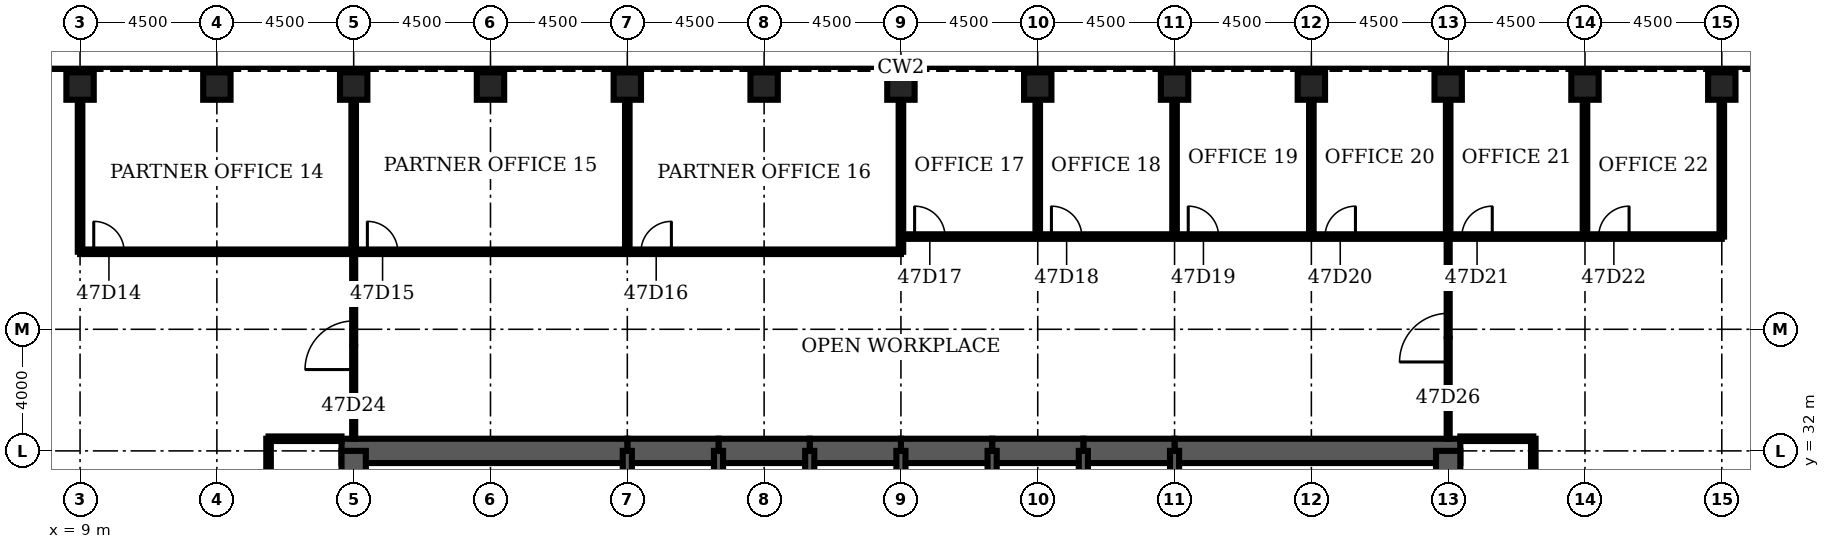
"""IFC4 building model, lengths in metres.
Left out: names, types, materials, properties, quantities, classifications, styles, units other than length and angle.
Written with IfcOpenShell. Run it as: python <this file> out.ifc"""

import sys

from ifc_helpers import new_model, si_unit, direction, frame, frame_2d, origin, origin_2d, place, context, subcontext, project, spatial, rectangle, hollow_rectangle, extrude, element, fill, save


model = new_model("IFC4")
c1 = context("Model", 3, precision=1e-05, world=origin(), true_north=direction((0.0, 1.0)))
c2 = subcontext(c1, "Body", "Model", "MODEL_VIEW")
j1 = project(units=[si_unit("LENGTHUNIT", "METRE"), si_unit("PLANEANGLEUNIT", "RADIAN")], contexts=[c1])
p1 = place(None, origin())
s1 = spatial("IfcSite", under=j1, at=p1, CompositionType="ELEMENT")
p2 = place(p1, origin())
s2 = spatial("IfcBuilding", under=s1, at=p2, CompositionType="ELEMENT")
p3 = place(p2, frame((0.0, 0.0, 211.0)))
s3 = spatial("IfcBuildingStorey", under=s2, at=p3, CompositionType="ELEMENT", Elevation=211.0)
for number, where, z_axis, x_axis in (
    (1, (63.0, 44.0, 0.0), (0.0, 0.0, 1.0), (0.0, 1.0, 0.0)),
    (2, (58.5, 44.0, 0.0), (0.0, 0.0, 1.0), (0.0, 1.0, 0.0)),
    (3, (54.0, 44.0, 0.0), (0.0, 0.0, 1.0), (0.0, 1.0, 0.0)),
    (4, (49.5, 44.0, 0.0), (0.0, 0.0, 1.0), (0.0, 1.0, 0.0)),
    (5, (45.0, 44.0, 0.0), (0.0, 0.0, 1.0), (0.0, 1.0, 0.0)),
    (6, (40.5, 44.0, 0.0), (0.0, 0.0, 1.0), (0.0, 1.0, 0.0)),
    (7, (36.0, 44.0, 0.0), (0.0, 0.0, 1.0), (0.0, 1.0, 0.0)),
    (8, (31.5, 44.0, 0.0), (0.0, 0.0, 1.0), (0.0, 1.0, 0.0)),
    (9, (27.0, 44.0, 0.0), (0.0, 0.0, 1.0), (0.0, 1.0, 0.0)),
    (10, (22.5, 44.0, 0.0), (0.0, 0.0, 1.0), (0.0, 1.0, 0.0)),
    (11, (18.0, 44.0, 0.0), (0.0, 0.0, 1.0), (0.0, 1.0, 0.0)),
    (12, (13.5, 44.0, 0.0), (0.0, 0.0, 1.0), (0.0, 1.0, 0.0)),
    (13, (9.0, 44.0, 0.0), (0.0, 0.0, 1.0), (0.0, 1.0, 0.0)),
):
    element("IfcColumn", number, at=place(p3, frame(where, z_axis=z_axis, x_axis=x_axis)), inside=s3, PredefinedType="COLUMN", context=c2, shape_type="SweptSolid", body=[
        extrude(hollow_rectangle(XDim=0.9, YDim=0.9, WallThickness=0.08, at=origin_2d()), origin(), (0.0, 0.0, 1.0), 4.2),
    ])
p4 = place(p3, frame((54.4, 32.0, 0.0), z_axis=(0.0, 0.0, 1.0), x_axis=(-1.0, 0.0, 0.0)))
e14 = element("IfcWall", 14, at=p4, inside=s3, PredefinedType="SHEAR", context=c2, shape_type="SweptSolid", body=[
    extrude(rectangle(XDim=9.4, YDim=0.8, at=frame_2d((4.7, 0.0))), origin(), (0.0, 0.0, 1.0), 4.2),
])
for number, where, z_axis, x_axis in (
    (15, (45.0, 32.0, 0.0), (0.0, 0.0, 1.0), (-1.0, 0.0, 0.0)),
    (16, (42.0, 32.0, 0.0), (0.0, 0.0, 1.0), (-1.0, 0.0, 0.0)),
    (17, (39.0, 32.0, 0.0), (0.0, 0.0, 1.0), (-1.0, 0.0, 0.0)),
    (18, (36.0, 32.0, 0.0), (0.0, 0.0, 1.0), (-1.0, 0.0, 0.0)),
    (19, (33.0, 32.0, 0.0), (0.0, 0.0, 1.0), (-1.0, 0.0, 0.0)),
    (20, (30.0, 32.0, 0.0), (0.0, 0.0, 1.0), (-1.0, 0.0, 0.0)),
):
    element("IfcWall", number, at=place(p3, frame(where, z_axis=z_axis, x_axis=x_axis)), inside=s3, PredefinedType="SHEAR", context=c2, shape_type="SweptSolid", body=[
        extrude(rectangle(XDim=3.0, YDim=0.8, at=frame_2d((1.5, 0.0))), origin(), (0.0, 0.0, 1.0), 4.2),
    ])
p5 = place(p3, frame((27.0, 32.0, 0.0), z_axis=(0.0, 0.0, 1.0), x_axis=(-1.0, 0.0, 0.0)))
e21 = element("IfcWall", 21, at=p5, inside=s3, PredefinedType="SHEAR", context=c2, shape_type="SweptSolid", body=[
    extrude(rectangle(XDim=9.4, YDim=0.8, at=frame_2d((4.7, 0.0))), origin(), (0.0, 0.0, 1.0), 4.2),
])
for number, where, z_axis, x_axis in (
    (22, (18.0, 32.0, 0.0), (0.0, 0.0, 1.0), (0.0, -1.0, 0.0)),
    (23, (54.0, 28.8, 0.0), (0.0, 0.0, 1.0), (0.0, 1.0, 0.0)),
):
    element("IfcWall", number, at=place(p3, frame(where, z_axis=z_axis, x_axis=x_axis)), inside=s3, PredefinedType="SHEAR", context=c2, shape_type="SweptSolid", body=[
        extrude(rectangle(XDim=3.2, YDim=0.8, at=frame_2d((1.6, 0.0))), origin(), (0.0, 0.0, 1.0), 4.2),
    ])
for number, where, z_axis, x_axis in (
    (24, (27.0, 28.8, 0.0), (0.0, 0.0, 1.0), (0.0, 1.0, 0.0)),
    (25, (30.0, 28.8, 0.0), (0.0, 0.0, 1.0), (0.0, 1.0, 0.0)),
    (26, (33.0, 28.8, 0.0), (0.0, 0.0, 1.0), (0.0, 1.0, 0.0)),
    (27, (36.0, 28.8, 0.0), (0.0, 0.0, 1.0), (0.0, 1.0, 0.0)),
    (28, (39.0, 28.8, 0.0), (0.0, 0.0, 1.0), (0.0, 1.0, 0.0)),
    (29, (42.0, 28.8, 0.0), (0.0, 0.0, 1.0), (0.0, 1.0, 0.0)),
    (30, (45.0, 28.8, 0.0), (0.0, 0.0, 1.0), (0.0, 1.0, 0.0)),
):
    element("IfcWall", number, at=place(p3, frame(where, z_axis=z_axis, x_axis=x_axis)), inside=s3, PredefinedType="SOLIDWALL", context=c2, shape_type="SweptSolid", body=[
        extrude(rectangle(XDim=3.2, YDim=0.3, at=frame_2d((1.6, 0.0))), origin(), (0.0, 0.0, 1.0), 4.2),
    ])
for number, where, z_axis, x_axis in (
    (31, (15.2, 32.4, 0.0), (0.0, 0.0, 1.0), (1.0, 0.0, 0.0)),
    (32, (54.4, 32.4, 0.0), (0.0, 0.0, 1.0), (1.0, 0.0, 0.0)),
):
    element("IfcWall", number, at=place(p3, frame(where, z_axis=z_axis, x_axis=x_axis)), inside=s3, PredefinedType="PARTITIONING", context=c2, shape_type="SweptSolid", body=[
        extrude(rectangle(XDim=2.4, YDim=0.15, at=frame_2d((1.2, 0.0))), origin(), (0.0, 0.0, 1.0), 3.0),
    ])
p6 = place(p3, frame((9.0, 38.55, 0.0), z_axis=(0.0, 0.0, 1.0), x_axis=(1.0, 0.0, 0.0)))
e33 = element("IfcWall", 33, at=p6, inside=s3, PredefinedType="PARTITIONING", context=c2, shape_type="SweptSolid", body=[
    extrude(rectangle(XDim=27.0, YDim=0.15, at=frame_2d((13.5, 0.0))), origin(), (0.0, 0.0, 1.0), 3.0),
])
p7 = place(p6, frame((0.45, 0.0, 0.0)))
e34 = element("IfcOpeningElement", 34, at=p7, cuts=e33, PredefinedType="OPENING", context=c2, shape_type="SweptSolid", body=[
    extrude(rectangle(XDim=1.0, YDim=2.1, at=frame_2d((0.5, 1.05))), frame((0.0, 0.085, 0.0), z_axis=(0.0, -1.0, 0.0), x_axis=(1.0, 0.0, 0.0)), (0.0, 0.0, 1.0), 0.17),
])
p8 = place(p6, frame((9.45, 0.0, 0.0)))
e35 = element("IfcOpeningElement", 35, at=p8, cuts=e33, PredefinedType="OPENING", context=c2, shape_type="SweptSolid", body=[
    extrude(rectangle(XDim=1.0, YDim=2.1, at=frame_2d((0.5, 1.05))), frame((0.0, 0.085, 0.0), z_axis=(0.0, -1.0, 0.0), x_axis=(1.0, 0.0, 0.0)), (0.0, 0.0, 1.0), 0.17),
])
p9 = place(p6, frame((18.45, 0.0, 0.0)))
e36 = element("IfcOpeningElement", 36, at=p9, cuts=e33, PredefinedType="OPENING", context=c2, shape_type="SweptSolid", body=[
    extrude(rectangle(XDim=1.0, YDim=2.1, at=frame_2d((0.5, 1.05))), frame((0.0, 0.085, 0.0), z_axis=(0.0, -1.0, 0.0), x_axis=(1.0, 0.0, 0.0)), (0.0, 0.0, 1.0), 0.17),
])
p10 = place(p3, frame((36.0, 39.05, 0.0), z_axis=(0.0, 0.0, 1.0), x_axis=(1.0, 0.0, 0.0)))
e37 = element("IfcWall", 37, at=p10, inside=s3, PredefinedType="PARTITIONING", context=c2, shape_type="SweptSolid", body=[
    extrude(rectangle(XDim=27.0, YDim=0.15, at=frame_2d((13.5, 0.0))), origin(), (0.0, 0.0, 1.0), 3.0),
])
p11 = place(p10, frame((0.45, 0.0, 0.0)))
e38 = element("IfcOpeningElement", 38, at=p11, cuts=e37, PredefinedType="OPENING", context=c2, shape_type="SweptSolid", body=[
    extrude(rectangle(XDim=1.0, YDim=2.1, at=frame_2d((0.5, 1.05))), frame((0.0, 0.085, 0.0), z_axis=(0.0, -1.0, 0.0), x_axis=(1.0, 0.0, 0.0)), (0.0, 0.0, 1.0), 0.17),
])
p12 = place(p10, frame((4.95, 0.0, 0.0)))
e39 = element("IfcOpeningElement", 39, at=p12, cuts=e37, PredefinedType="OPENING", context=c2, shape_type="SweptSolid", body=[
    extrude(rectangle(XDim=1.0, YDim=2.1, at=frame_2d((0.5, 1.05))), frame((0.0, 0.085, 0.0), z_axis=(0.0, -1.0, 0.0), x_axis=(1.0, 0.0, 0.0)), (0.0, 0.0, 1.0), 0.17),
])
p13 = place(p10, frame((9.45, 0.0, 0.0)))
e40 = element("IfcOpeningElement", 40, at=p13, cuts=e37, PredefinedType="OPENING", context=c2, shape_type="SweptSolid", body=[
    extrude(rectangle(XDim=1.0, YDim=2.1, at=frame_2d((0.5, 1.05))), frame((0.0, 0.085, 0.0), z_axis=(0.0, -1.0, 0.0), x_axis=(1.0, 0.0, 0.0)), (0.0, 0.0, 1.0), 0.17),
])
p14 = place(p10, frame((13.95, 0.0, 0.0)))
e41 = element("IfcOpeningElement", 41, at=p14, cuts=e37, PredefinedType="OPENING", context=c2, shape_type="SweptSolid", body=[
    extrude(rectangle(XDim=1.0, YDim=2.1, at=frame_2d((0.5, 1.05))), frame((0.0, 0.085, 0.0), z_axis=(0.0, -1.0, 0.0), x_axis=(1.0, 0.0, 0.0)), (0.0, 0.0, 1.0), 0.17),
])
p15 = place(p10, frame((18.45, 0.0, 0.0)))
e42 = element("IfcOpeningElement", 42, at=p15, cuts=e37, PredefinedType="OPENING", context=c2, shape_type="SweptSolid", body=[
    extrude(rectangle(XDim=1.0, YDim=2.1, at=frame_2d((0.5, 1.05))), frame((0.0, 0.085, 0.0), z_axis=(0.0, -1.0, 0.0), x_axis=(1.0, 0.0, 0.0)), (0.0, 0.0, 1.0), 0.17),
])
p16 = place(p10, frame((22.95, 0.0, 0.0)))
e43 = element("IfcOpeningElement", 43, at=p16, cuts=e37, PredefinedType="OPENING", context=c2, shape_type="SweptSolid", body=[
    extrude(rectangle(XDim=1.0, YDim=2.1, at=frame_2d((0.5, 1.05))), frame((0.0, 0.085, 0.0), z_axis=(0.0, -1.0, 0.0), x_axis=(1.0, 0.0, 0.0)), (0.0, 0.0, 1.0), 0.17),
])
p17 = place(p3, frame((9.0, 38.55, 0.0), z_axis=(0.0, 0.0, 1.0), x_axis=(0.0, 1.0, 0.0)))
e44 = element("IfcWall", 44, at=p17, inside=s3, PredefinedType="PARTITIONING", context=c2, shape_type="SweptSolid", body=[
    extrude(rectangle(XDim=5.0, YDim=0.15, at=frame_2d((2.5, 0.0))), origin(), (0.0, 0.0, 1.0), 3.0),
])
p18 = place(p3, frame((15.2, 13.8, 0.0), z_axis=(0.0, 0.0, 1.0), x_axis=(0.0, 1.0, 0.0)))
e45 = element("IfcWall", 45, at=p18, inside=s3, PredefinedType="PARTITIONING", context=c2, shape_type="SweptSolid", body=[
    extrude(rectangle(XDim=18.6, YDim=0.15, at=frame_2d((9.3, 0.0))), origin(), (0.0, 0.0, 1.0), 3.0),
])
p19 = place(p18, frame((8.7, 0.0, 0.0)))
e46 = element("IfcOpeningElement", 46, at=p19, cuts=e45, PredefinedType="OPENING", context=c2, shape_type="SweptSolid", body=[
    extrude(rectangle(XDim=1.2, YDim=2.1, at=frame_2d((0.6, 1.05))), frame((0.0, 0.085, 0.0), z_axis=(0.0, -1.0, 0.0), x_axis=(1.0, 0.0, 0.0)), (0.0, 0.0, 1.0), 0.17),
])
p20 = place(p3, frame((18.0, 32.4, 0.0), z_axis=(0.0, 0.0, 1.0), x_axis=(0.0, 1.0, 0.0)))
e47 = element("IfcWall", 47, at=p20, inside=s3, PredefinedType="PARTITIONING", context=c2, shape_type="SweptSolid", body=[
    extrude(rectangle(XDim=6.15, YDim=0.1, at=frame_2d((3.075, 0.0))), origin(), (0.0, 0.0, 1.0), 3.0),
])
p21 = place(p20, frame((2.275, 0.0, 0.0)))
e48 = element("IfcOpeningElement", 48, at=p21, cuts=e47, PredefinedType="OPENING", context=c2, shape_type="SweptSolid", body=[
    extrude(rectangle(XDim=1.6, YDim=2.1, at=frame_2d((0.8, 1.05))), frame((0.0, 0.06, 0.0), z_axis=(0.0, -1.0, 0.0), x_axis=(1.0, 0.0, 0.0)), (0.0, 0.0, 1.0), 0.12),
])
for number, where, z_axis, x_axis in (
    (49, (18.0, 38.55, 0.0), (0.0, 0.0, 1.0), (0.0, 1.0, 0.0)),
    (50, (27.0, 38.55, 0.0), (0.0, 0.0, 1.0), (0.0, 1.0, 0.0)),
    (51, (36.0, 38.55, 0.0), (0.0, 0.0, 1.0), (0.0, 1.0, 0.0)),
):
    element("IfcWall", number, at=place(p3, frame(where, z_axis=z_axis, x_axis=x_axis)), inside=s3, PredefinedType="PARTITIONING", context=c2, shape_type="SweptSolid", body=[
        extrude(rectangle(XDim=5.0, YDim=0.15, at=frame_2d((2.5, 0.0))), origin(), (0.0, 0.0, 1.0), 3.0),
    ])
for number, where, z_axis, x_axis in (
    (52, (40.5, 39.05, 0.0), (0.0, 0.0, 1.0), (0.0, 1.0, 0.0)),
    (53, (45.0, 39.05, 0.0), (0.0, 0.0, 1.0), (0.0, 1.0, 0.0)),
    (54, (49.5, 39.05, 0.0), (0.0, 0.0, 1.0), (0.0, 1.0, 0.0)),
):
    element("IfcWall", number, at=place(p3, frame(where, z_axis=z_axis, x_axis=x_axis)), inside=s3, PredefinedType="PARTITIONING", context=c2, shape_type="SweptSolid", body=[
        extrude(rectangle(XDim=4.5, YDim=0.15, at=frame_2d((2.25, 0.0))), origin(), (0.0, 0.0, 1.0), 3.0),
    ])
p22 = place(p3, frame((54.0, 32.4, 0.0), z_axis=(0.0, 0.0, 1.0), x_axis=(0.0, 1.0, 0.0)))
e55 = element("IfcWall", 55, at=p22, inside=s3, PredefinedType="PARTITIONING", context=c2, shape_type="SweptSolid", body=[
    extrude(rectangle(XDim=6.65, YDim=0.1, at=frame_2d((3.325, 0.0))), origin(), (0.0, 0.0, 1.0), 3.0),
])
p23 = place(p22, frame((2.525, 0.0, 0.0)))
e56 = element("IfcOpeningElement", 56, at=p23, cuts=e55, PredefinedType="OPENING", context=c2, shape_type="SweptSolid", body=[
    extrude(rectangle(XDim=1.6, YDim=2.1, at=frame_2d((0.8, 1.05))), frame((0.0, 0.06, 0.0), z_axis=(0.0, -1.0, 0.0), x_axis=(1.0, 0.0, 0.0)), (0.0, 0.0, 1.0), 0.12),
])
p24 = place(p3, frame((54.0, 39.05, 0.0), z_axis=(0.0, 0.0, 1.0), x_axis=(0.0, 1.0, 0.0)))
e57 = element("IfcWall", 57, at=p24, inside=s3, PredefinedType="PARTITIONING", context=c2, shape_type="SweptSolid", body=[
    extrude(rectangle(XDim=4.5, YDim=0.15, at=frame_2d((2.25, 0.0))), origin(), (0.0, 0.0, 1.0), 3.0),
])
p25 = place(p3, frame((56.8, 13.8, 0.0), z_axis=(0.0, 0.0, 1.0), x_axis=(0.0, 1.0, 0.0)))
e58 = element("IfcWall", 58, at=p25, inside=s3, PredefinedType="PARTITIONING", context=c2, shape_type="SweptSolid", body=[
    extrude(rectangle(XDim=18.6, YDim=0.15, at=frame_2d((9.3, 0.0))), origin(), (0.0, 0.0, 1.0), 3.0),
])
p26 = place(p25, frame((8.7, 0.0, 0.0)))
e59 = element("IfcOpeningElement", 59, at=p26, cuts=e58, PredefinedType="OPENING", context=c2, shape_type="SweptSolid", body=[
    extrude(rectangle(XDim=1.2, YDim=2.1, at=frame_2d((0.6, 1.05))), frame((0.0, 0.085, 0.0), z_axis=(0.0, -1.0, 0.0), x_axis=(1.0, 0.0, 0.0)), (0.0, 0.0, 1.0), 0.17),
])
for number, where, z_axis, x_axis in (
    (60, (58.5, 39.05, 0.0), (0.0, 0.0, 1.0), (0.0, 1.0, 0.0)),
    (61, (63.0, 39.05, 0.0), (0.0, 0.0, 1.0), (0.0, 1.0, 0.0)),
):
    element("IfcWall", number, at=place(p3, frame(where, z_axis=z_axis, x_axis=x_axis)), inside=s3, PredefinedType="PARTITIONING", context=c2, shape_type="SweptSolid", body=[
        extrude(rectangle(XDim=4.5, YDim=0.15, at=frame_2d((2.25, 0.0))), origin(), (0.0, 0.0, 1.0), 3.0),
    ])
p27 = place(p7, origin())
e62 = element("IfcDoor", 62, at=p27, inside=s3, OperationType="SINGLE_SWING_LEFT", PredefinedType="DOOR", context=c2, shape_type="SweptSolid", body=[
    extrude(rectangle(XDim=1.0, YDim=2.1, at=frame_2d((0.5, 1.05))), frame((0.0, 0.025, 0.0), z_axis=(0.0, -1.0, 0.0), x_axis=(1.0, 0.0, 0.0)), (0.0, 0.0, 1.0), 0.05),
])
fill(e34, e62)
p28 = place(p8, origin())
e63 = element("IfcDoor", 63, at=p28, inside=s3, OperationType="SINGLE_SWING_LEFT", PredefinedType="DOOR", context=c2, shape_type="SweptSolid", body=[
    extrude(rectangle(XDim=1.0, YDim=2.1, at=frame_2d((0.5, 1.05))), frame((0.0, 0.025, 0.0), z_axis=(0.0, -1.0, 0.0), x_axis=(1.0, 0.0, 0.0)), (0.0, 0.0, 1.0), 0.05),
])
fill(e35, e63)
p29 = place(p9, origin())
e64 = element("IfcDoor", 64, at=p29, inside=s3, OperationType="SINGLE_SWING_RIGHT", PredefinedType="DOOR", context=c2, shape_type="SweptSolid", body=[
    extrude(rectangle(XDim=1.0, YDim=2.1, at=frame_2d((0.5, 1.05))), frame((0.0, 0.025, 0.0), z_axis=(0.0, -1.0, 0.0), x_axis=(1.0, 0.0, 0.0)), (0.0, 0.0, 1.0), 0.05),
])
fill(e36, e64)
p30 = place(p11, origin())
e65 = element("IfcDoor", 65, at=p30, inside=s3, OperationType="SINGLE_SWING_LEFT", PredefinedType="DOOR", context=c2, shape_type="SweptSolid", body=[
    extrude(rectangle(XDim=1.0, YDim=2.1, at=frame_2d((0.5, 1.05))), frame((0.0, 0.025, 0.0), z_axis=(0.0, -1.0, 0.0), x_axis=(1.0, 0.0, 0.0)), (0.0, 0.0, 1.0), 0.05),
])
fill(e38, e65)
p31 = place(p12, origin())
e66 = element("IfcDoor", 66, at=p31, inside=s3, OperationType="SINGLE_SWING_LEFT", PredefinedType="DOOR", context=c2, shape_type="SweptSolid", body=[
    extrude(rectangle(XDim=1.0, YDim=2.1, at=frame_2d((0.5, 1.05))), frame((0.0, 0.025, 0.0), z_axis=(0.0, -1.0, 0.0), x_axis=(1.0, 0.0, 0.0)), (0.0, 0.0, 1.0), 0.05),
])
fill(e39, e66)
p32 = place(p13, origin())
e67 = element("IfcDoor", 67, at=p32, inside=s3, OperationType="SINGLE_SWING_LEFT", PredefinedType="DOOR", context=c2, shape_type="SweptSolid", body=[
    extrude(rectangle(XDim=1.0, YDim=2.1, at=frame_2d((0.5, 1.05))), frame((0.0, 0.025, 0.0), z_axis=(0.0, -1.0, 0.0), x_axis=(1.0, 0.0, 0.0)), (0.0, 0.0, 1.0), 0.05),
])
fill(e40, e67)
p33 = place(p14, origin())
e68 = element("IfcDoor", 68, at=p33, inside=s3, OperationType="SINGLE_SWING_RIGHT", PredefinedType="DOOR", context=c2, shape_type="SweptSolid", body=[
    extrude(rectangle(XDim=1.0, YDim=2.1, at=frame_2d((0.5, 1.05))), frame((0.0, 0.025, 0.0), z_axis=(0.0, -1.0, 0.0), x_axis=(1.0, 0.0, 0.0)), (0.0, 0.0, 1.0), 0.05),
])
fill(e41, e68)
p34 = place(p15, origin())
e69 = element("IfcDoor", 69, at=p34, inside=s3, OperationType="SINGLE_SWING_RIGHT", PredefinedType="DOOR", context=c2, shape_type="SweptSolid", body=[
    extrude(rectangle(XDim=1.0, YDim=2.1, at=frame_2d((0.5, 1.05))), frame((0.0, 0.025, 0.0), z_axis=(0.0, -1.0, 0.0), x_axis=(1.0, 0.0, 0.0)), (0.0, 0.0, 1.0), 0.05),
])
fill(e42, e69)
p35 = place(p16, origin())
e70 = element("IfcDoor", 70, at=p35, inside=s3, OperationType="SINGLE_SWING_RIGHT", PredefinedType="DOOR", context=c2, shape_type="SweptSolid", body=[
    extrude(rectangle(XDim=1.0, YDim=2.1, at=frame_2d((0.5, 1.05))), frame((0.0, 0.025, 0.0), z_axis=(0.0, -1.0, 0.0), x_axis=(1.0, 0.0, 0.0)), (0.0, 0.0, 1.0), 0.05),
])
fill(e43, e70)
p36 = place(p21, origin())
e71 = element("IfcDoor", 71, at=p36, inside=s3, OperationType="SINGLE_SWING_LEFT", PredefinedType="DOOR", context=c2, shape_type="SweptSolid", body=[
    extrude(rectangle(XDim=1.6, YDim=2.1, at=frame_2d((0.8, 1.05))), frame((0.0, 0.025, 0.0), z_axis=(0.0, -1.0, 0.0), x_axis=(1.0, 0.0, 0.0)), (0.0, 0.0, 1.0), 0.05),
])
fill(e48, e71)
p37 = place(p23, origin())
e72 = element("IfcDoor", 72, at=p37, inside=s3, OperationType="SINGLE_SWING_LEFT", PredefinedType="DOOR", context=c2, shape_type="SweptSolid", body=[
    extrude(rectangle(XDim=1.6, YDim=2.1, at=frame_2d((0.8, 1.05))), frame((0.0, 0.025, 0.0), z_axis=(0.0, -1.0, 0.0), x_axis=(1.0, 0.0, 0.0)), (0.0, 0.0, 1.0), 0.05),
])
fill(e56, e72)
save(model, sys.argv[1])
